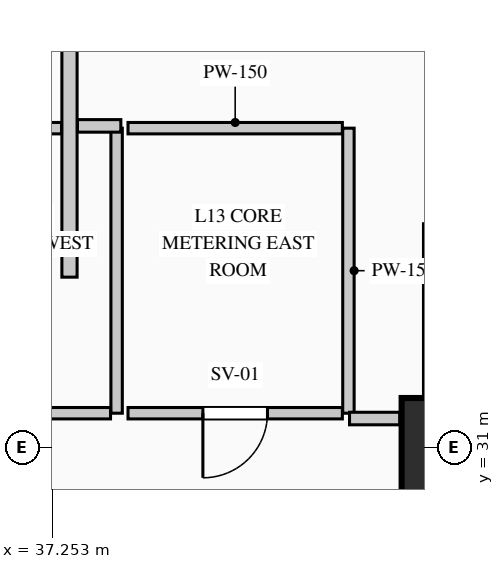
"""IFC4 building model, lengths in metres.
Left out: names, types, materials, properties, quantities, classifications, styles, units other than length and angle.
Written with IfcOpenShell. Run it as: python <this file> out.ifc"""

import sys

from ifc_helpers import new_model, si_unit, direction, frame, frame_2d, origin, origin_2d, place, context, subcontext, project, spatial, rectangle, extrude, element, fill, save


model = new_model("IFC4")
c1 = context("Model", 3, precision=1e-05, world=origin(), true_north=direction((0.0, 1.0)))
c2 = subcontext(c1, "Body", "Model", "MODEL_VIEW")
j1 = project(units=[si_unit("LENGTHUNIT", "METRE"), si_unit("PLANEANGLEUNIT", "RADIAN")], contexts=[c1])
p1 = place(None, origin())
s1 = spatial("IfcSite", under=j1, at=p1, CompositionType="ELEMENT")
p2 = place(p1, origin())
s2 = spatial("IfcBuilding", under=s1, at=p2, CompositionType="ELEMENT")
p3 = place(p2, frame((0.0, 0.0, 57.8)))
s3 = spatial("IfcBuildingStorey", under=s2, at=p3, CompositionType="ELEMENT", Elevation=57.8)
p4 = place(p3, frame((42.5, 31.0, 0.0), z_axis=(0.0, 0.0, 1.0), x_axis=(1.0, 0.0, 0.0)))
e1 = element("IfcColumn", 1, at=p4, inside=s3, PredefinedType="COLUMN", context=c2, shape_type="SweptSolid", body=[
    extrude(rectangle(XDim=1.3, YDim=1.3, at=origin_2d()), origin(), (0.0, 0.0, 1.0), 4.4),
])
p5 = place(p3, frame((37.48, 33.24, 0.0), z_axis=(0.0, 0.0, 1.0), x_axis=(0.0, 1.0, 0.0)))
e2 = element("IfcWall", 2, at=p5, inside=s3, PredefinedType="PARTITIONING", context=c2, shape_type="SweptSolid", body=[
    extrude(rectangle(XDim=7.42, YDim=0.2, at=frame_2d((3.71, 0.0))), origin(), (0.0, 0.0, 1.0), 4.1),
])
p6 = place(p3, frame((38.1, 35.2, 0.0), z_axis=(0.0, 0.0, 1.0), x_axis=(0.0, -1.0, 0.0)))
e3 = element("IfcWall", 3, at=p6, inside=s3, PredefinedType="PARTITIONING", context=c2, shape_type="SweptSolid", body=[
    extrude(rectangle(XDim=3.75, YDim=0.15, at=frame_2d((1.875, 0.0))), origin(), (0.0, 0.0, 1.0), 4.1),
])
p7 = place(p3, frame((38.02, 31.45, 0.0), z_axis=(0.0, 0.0, 1.0), x_axis=(-1.0, 0.0, 0.0)))
e4 = element("IfcWall", 4, at=p7, inside=s3, PredefinedType="PARTITIONING", context=c2, shape_type="SweptSolid", body=[
    extrude(rectangle(XDim=2.77, YDim=0.15, at=frame_2d((1.385, 0.0))), origin(), (0.0, 0.0, 1.0), 4.1),
])
p8 = place(p7, frame((0.96, 0.0, 0.0)))
e5 = element("IfcOpeningElement", 5, at=p8, cuts=e4, PredefinedType="OPENING", context=c2, shape_type="SweptSolid", body=[
    extrude(rectangle(XDim=0.85, YDim=2.1, at=frame_2d((0.425, 1.05))), frame((0.0, 0.085, 0.0), z_axis=(0.0, -1.0, 0.0), x_axis=(1.0, 0.0, 0.0)), (0.0, 0.0, 1.0), 0.17),
])
p9 = place(p3, frame((35.33, 35.2, 0.0), z_axis=(0.0, 0.0, 1.0), x_axis=(1.0, 0.0, 0.0)))
e6 = element("IfcWall", 6, at=p9, inside=s3, PredefinedType="PARTITIONING", context=c2, shape_type="SweptSolid", body=[
    extrude(rectangle(XDim=2.045, YDim=0.15, at=frame_2d((1.022, 0.0))), origin(), (0.0, 0.0, 1.0), 4.1),
])
p10 = place(p3, frame((41.15, 35.2, 0.0), z_axis=(0.0, 0.0, 1.0), x_axis=(0.0, -1.0, 0.0)))
e7 = element("IfcWall", 7, at=p10, inside=s3, PredefinedType="PARTITIONING", context=c2, shape_type="SweptSolid", body=[
    extrude(rectangle(XDim=3.75, YDim=0.15, at=frame_2d((1.875, 0.0))), origin(), (0.0, 0.0, 1.0), 4.1),
])
p11 = place(p3, frame((41.07, 31.45, 0.0), z_axis=(0.0, 0.0, 1.0), x_axis=(-1.0, 0.0, 0.0)))
e8 = element("IfcWall", 8, at=p11, inside=s3, PredefinedType="PARTITIONING", context=c2, shape_type="SweptSolid", body=[
    extrude(rectangle(XDim=2.82, YDim=0.15, at=frame_2d((1.41, 0.0))), origin(), (0.0, 0.0, 1.0), 4.1),
])
p12 = place(p11, frame((0.985, 0.0, 0.0)))
e9 = element("IfcOpeningElement", 9, at=p12, cuts=e8, PredefinedType="OPENING", context=c2, shape_type="SweptSolid", body=[
    extrude(rectangle(XDim=0.85, YDim=2.1, at=frame_2d((0.425, 1.05))), frame((0.0, 0.085, 0.0), z_axis=(0.0, -1.0, 0.0), x_axis=(1.0, 0.0, 0.0)), (0.0, 0.0, 1.0), 0.17),
])
p13 = place(p3, frame((38.25, 35.2, 0.0), z_axis=(0.0, 0.0, 1.0), x_axis=(1.0, 0.0, 0.0)))
e10 = element("IfcWall", 10, at=p13, inside=s3, PredefinedType="PARTITIONING", context=c2, shape_type="SweptSolid", body=[
    extrude(rectangle(XDim=2.82, YDim=0.15, at=frame_2d((1.41, 0.0))), origin(), (0.0, 0.0, 1.0), 4.1),
])
p14 = place(p3, frame((42.22, 33.942, 0.0), z_axis=(0.0, 0.0, 1.0), x_axis=(0.0, -1.0, 0.0)))
e11 = element("IfcWall", 11, at=p14, inside=s3, PredefinedType="PARTITIONING", context=c2, shape_type="SweptSolid", body=[
    extrude(rectangle(XDim=2.267, YDim=0.165, at=frame_2d((1.134, 0.0))), origin(), (0.0, 0.0, 1.0), 4.1),
])
p15 = place(p3, frame((41.825, 31.38, 0.0), z_axis=(0.0, 0.0, 1.0), x_axis=(-1.0, 0.0, 0.0)))
e12 = element("IfcWall", 12, at=p15, inside=s3, PredefinedType="PARTITIONING", context=c2, shape_type="SweptSolid", body=[
    extrude(rectangle(XDim=0.66, YDim=0.165, at=frame_2d((0.33, 0.0))), origin(), (0.0, 0.0, 1.0), 4.1),
])
p16 = place(p3, frame((38.156, 35.23, 0.0), z_axis=(0.0, 0.0, 1.0), x_axis=(-1.0, 0.0, 0.0)))
e13 = element("IfcWall", 13, at=p16, inside=s3, PredefinedType="PARTITIONING", context=c2, shape_type="SweptSolid", body=[
    extrude(rectangle(XDim=0.571, YDim=0.165, at=frame_2d((0.285, 0.0))), origin(), (0.0, 0.0, 1.0), 4.1),
])
p17 = place(p12, origin())
e14 = element("IfcDoor", 14, at=p17, inside=s3, OperationType="SINGLE_SWING_RIGHT", PredefinedType="DOOR", context=c2, shape_type="SweptSolid", body=[
    extrude(rectangle(XDim=0.85, YDim=2.1, at=frame_2d((0.425, 1.05))), frame((0.0, 0.025, 0.0), z_axis=(0.0, -1.0, 0.0), x_axis=(1.0, 0.0, 0.0)), (0.0, 0.0, 1.0), 0.05),
])
fill(e9, e14)
save(model, sys.argv[1])
